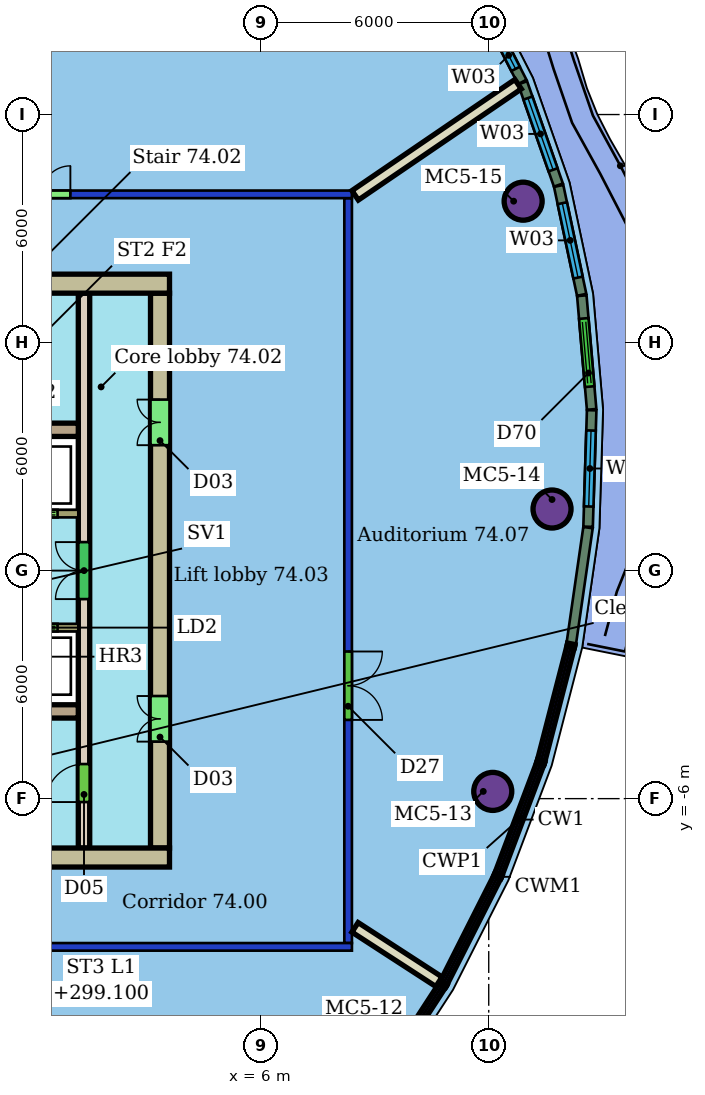
"""IFC4 building model, lengths in metres.
Left out: names, types, materials, properties, quantities, classifications, styles, units other than length and angle.
Written with IfcOpenShell. Run it as: python <this file> out.ifc"""

import sys

from ifc_helpers import new_model, si_unit, direction, frame, frame_2d, origin, origin_2d, place, context, subcontext, project, spatial, rectangle, hollow_circle, extrude, element, fill, save


model = new_model("IFC4")
c1 = context("Model", 3, precision=1e-05, world=origin(), true_north=direction((0.0, 1.0)))
c2 = subcontext(c1, "Body", "Model", "MODEL_VIEW")
j1 = project(units=[si_unit("LENGTHUNIT", "METRE"), si_unit("PLANEANGLEUNIT", "RADIAN")], contexts=[c1])
p1 = place(None, origin())
s1 = spatial("IfcSite", under=j1, at=p1, CompositionType="ELEMENT")
p2 = place(p1, origin())
s2 = spatial("IfcBuilding", under=s1, at=p2, CompositionType="ELEMENT")
p3 = place(p2, frame((0.0, 0.0, 297.3)))
s3 = spatial("IfcBuildingStorey", under=s2, at=p3, CompositionType="ELEMENT", Elevation=297.3)
for number, where, z_axis, x_axis in (
    (1, (12.106, -5.81, 0.0), (0.0, 0.0, 1.0), (1.0, 0.0, 0.0)),
    (2, (13.666, 1.62, 0.0), (0.0, 0.0, 1.0), (1.0, 0.0, 0.0)),
    (3, (12.906, 9.72, 0.0), (0.0, 0.0, 1.0), (1.0, 0.0, 0.0)),
):
    element("IfcColumn", number, at=place(p3, frame(where, z_axis=z_axis, x_axis=x_axis)), inside=s3, PredefinedType="COLUMN", context=c2, shape_type="SweptSolid", body=[
        extrude(hollow_circle(Radius=0.5, WallThickness=0.04, at=origin_2d()), origin(), (0.0, 0.0, 1.0), 3.45),
    ])
p4 = place(p3, frame((8.4, -9.9, 0.0), z_axis=(0.0, 0.0, 1.0), x_axis=(-1.0, 0.0, 0.0)))
e4 = element("IfcWall", 4, at=p4, inside=s3, PredefinedType="PARTITIONING", context=c2, shape_type="SweptSolid", body=[
    extrude(rectangle(XDim=28.8, YDim=0.2, at=frame_2d((14.4, 0.0))), origin(), (0.0, 0.0, 1.0), 3.1),
])
p5 = place(p4, frame((22.465, 0.0, 0.0)))
e5 = element("IfcOpeningElement", 5, at=p5, cuts=e4, PredefinedType="OPENING", context=c2, shape_type="SweptSolid", body=[
    extrude(rectangle(XDim=1.5, YDim=2.1, at=frame_2d((0.75, 1.05))), frame((0.0, 0.11, 0.0), z_axis=(0.0, -1.0, 0.0), x_axis=(1.0, 0.0, 0.0)), (0.0, 0.0, 1.0), 0.22),
])
p6 = place(p4, frame((17.885, 0.0, 0.0)))
e6 = element("IfcOpeningElement", 6, at=p6, cuts=e4, PredefinedType="OPENING", context=c2, shape_type="SweptSolid", body=[
    extrude(rectangle(XDim=0.9, YDim=2.1, at=frame_2d((0.45, 1.05))), frame((0.0, 0.11, 0.0), z_axis=(0.0, -1.0, 0.0), x_axis=(1.0, 0.0, 0.0)), (0.0, 0.0, 1.0), 0.22),
])
p7 = place(p4, frame((9.462, 0.0, 0.0)))
e7 = element("IfcOpeningElement", 7, at=p7, cuts=e4, PredefinedType="OPENING", context=c2, shape_type="SweptSolid", body=[
    extrude(rectangle(XDim=1.5, YDim=2.1, at=frame_2d((0.75, 1.05))), frame((0.0, 0.11, 0.0), z_axis=(0.0, -1.0, 0.0), x_axis=(1.0, 0.0, 0.0)), (0.0, 0.0, 1.0), 0.22),
])
p8 = place(p3, frame((-20.4, 9.9, 0.0), z_axis=(0.0, 0.0, 1.0), x_axis=(1.0, 0.0, 0.0)))
e8 = element("IfcWall", 8, at=p8, inside=s3, PredefinedType="PARTITIONING", context=c2, shape_type="SweptSolid", body=[
    extrude(rectangle(XDim=28.8, YDim=0.2, at=frame_2d((14.4, 0.0))), origin(), (0.0, 0.0, 1.0), 3.1),
])
p9 = place(p8, frame((11.686, 0.0, 0.0)))
e9 = element("IfcOpeningElement", 9, at=p9, cuts=e8, PredefinedType="OPENING", context=c2, shape_type="SweptSolid", body=[
    extrude(rectangle(XDim=1.8, YDim=2.1, at=frame_2d((0.9, 1.05))), frame((0.0, 0.11, 0.0), z_axis=(0.0, -1.0, 0.0), x_axis=(1.0, 0.0, 0.0)), (0.0, 0.0, 1.0), 0.22),
])
p10 = place(p8, frame((5.897, 0.0, 0.0)))
e10 = element("IfcOpeningElement", 10, at=p10, cuts=e8, PredefinedType="OPENING", context=c2, shape_type="SweptSolid", body=[
    extrude(rectangle(XDim=1.5, YDim=2.1, at=frame_2d((0.75, 1.05))), frame((0.0, 0.11, 0.0), z_axis=(0.0, -1.0, 0.0), x_axis=(1.0, 0.0, 0.0)), (0.0, 0.0, 1.0), 0.22),
])
p11 = place(p8, frame((19.891, 0.0, 0.0)))
e11 = element("IfcOpeningElement", 11, at=p11, cuts=e8, PredefinedType="OPENING", context=c2, shape_type="SweptSolid", body=[
    extrude(rectangle(XDim=1.5, YDim=2.4, at=frame_2d((0.75, 1.2))), frame((0.0, 0.11, 0.0), z_axis=(0.0, -1.0, 0.0), x_axis=(1.0, 0.0, 0.0)), (0.0, 0.0, 1.0), 0.22),
])
p12 = place(p3, frame((8.3, 9.8, 0.0), z_axis=(0.0, 0.0, 1.0), x_axis=(0.0, -1.0, 0.0)))
e12 = element("IfcWall", 12, at=p12, inside=s3, PredefinedType="PARTITIONING", context=c2, shape_type="SweptSolid", body=[
    extrude(rectangle(XDim=19.6, YDim=0.2, at=frame_2d((9.8, 0.0))), origin(), (0.0, 0.0, 1.0), 3.1),
])
p13 = place(p12, frame((11.929, 0.0, 0.0)))
e13 = element("IfcOpeningElement", 13, at=p13, cuts=e12, PredefinedType="OPENING", context=c2, shape_type="SweptSolid", body=[
    extrude(rectangle(XDim=1.8, YDim=2.4, at=frame_2d((0.9, 1.2))), frame((0.0, 0.11, 0.0), z_axis=(0.0, -1.0, 0.0), x_axis=(1.0, 0.0, 0.0)), (0.0, 0.0, 1.0), 0.22),
])
p14 = place(p3, frame((10.691, -10.819, 0.0), z_axis=(0.0, 0.0, 1.0), x_axis=(-0.839156905536, 0.543889407776, 0.0)))
e14 = element("IfcWall", 14, at=p14, inside=s3, PredefinedType="PARTITIONING", context=c2, shape_type="SweptSolid", body=[
    extrude(rectangle(XDim=2.633, YDim=0.3, at=frame_2d((1.316, 0.0))), origin(), (0.0, 0.0, 1.0), 3.45),
])
p15 = place(p3, frame((12.772, 12.797, 0.0), z_axis=(0.0, 0.0, 1.0), x_axis=(-0.826281084678, -0.563257995152, 0.0)))
e15 = element("IfcWall", 15, at=p15, inside=s3, PredefinedType="PARTITIONING", context=c2, shape_type="SweptSolid", body=[
    extrude(rectangle(XDim=5.19, YDim=0.3, at=frame_2d((2.595, 0.0))), origin(), (0.0, 0.0, 1.0), 3.45),
])
p16 = place(p3, frame((14.173, -1.912, 0.0), z_axis=(0.0, 0.0, 1.0), x_axis=(0.142921873415, 0.989733973399, 0.0)))
e16 = element("IfcWall", 16, at=p16, inside=s3, PredefinedType="SOLIDWALL", context=c2, shape_type="SweptSolid", body=[
    extrude(rectangle(XDim=3.075, YDim=0.25, at=frame_2d((1.537, 0.0))), origin(), (0.0, 0.0, 1.0), 3.15),
])
p17 = place(p3, frame((14.615, 1.154, 0.0), z_axis=(0.0, 0.0, 1.0), x_axis=(0.030643350627, 0.999530382261, 0.0)))
e17 = element("IfcWall", 17, at=p17, inside=s3, PredefinedType="SOLIDWALL", context=c2, shape_type="SweptSolid", body=[
    extrude(rectangle(XDim=3.067, YDim=0.25, at=frame_2d((1.534, 0.0))), origin(), (0.0, 0.0, 1.0), 3.15),
])
p18 = place(p17, frame((0.534, 0.0, 0.9)))
e18 = element("IfcOpeningElement", 18, at=p18, cuts=e17, PredefinedType="OPENING", context=c2, shape_type="SweptSolid", body=[
    extrude(rectangle(XDim=2.0, YDim=2.1, at=frame_2d((1.0, 1.05))), frame((0.0, 0.135, 0.0), z_axis=(0.0, -1.0, 0.0), x_axis=(1.0, 0.0, 0.0)), (0.0, 0.0, 1.0), 0.27),
])
p19 = place(p3, frame((14.708, 4.242, 0.0), z_axis=(0.0, 0.0, 1.0), x_axis=(-0.086187518859, 0.996278932625, 0.0)))
e19 = element("IfcWall", 19, at=p19, inside=s3, PredefinedType="SOLIDWALL", context=c2, shape_type="SweptSolid", body=[
    extrude(rectangle(XDim=3.003, YDim=0.25, at=frame_2d((1.501, 0.0))), origin(), (0.0, 0.0, 1.0), 3.15),
])
p20 = place(p19, frame((0.601, 0.0, 0.0)))
e20 = element("IfcOpeningElement", 20, at=p20, cuts=e19, PredefinedType="OPENING", context=c2, shape_type="SweptSolid", body=[
    extrude(rectangle(XDim=1.8, YDim=2.4, at=frame_2d((0.9, 1.2))), frame((0.0, 0.135, 0.0), z_axis=(0.0, -1.0, 0.0), x_axis=(1.0, 0.0, 0.0)), (0.0, 0.0, 1.0), 0.27),
])
p21 = place(p3, frame((14.446, 7.256, 0.0), z_axis=(0.0, 0.0, 1.0), x_axis=(-0.206909487165, 0.978360089191, 0.0)))
e21 = element("IfcWall", 21, at=p21, inside=s3, PredefinedType="SOLIDWALL", context=c2, shape_type="SweptSolid", body=[
    extrude(rectangle(XDim=2.929, YDim=0.25, at=frame_2d((1.464, 0.0))), origin(), (0.0, 0.0, 1.0), 3.15),
])
p22 = place(p21, frame((0.464, 0.0, 0.9)))
e22 = element("IfcOpeningElement", 22, at=p22, cuts=e21, PredefinedType="OPENING", context=c2, shape_type="SweptSolid", body=[
    extrude(rectangle(XDim=2.0, YDim=2.1, at=frame_2d((1.0, 1.05))), frame((0.0, 0.135, 0.0), z_axis=(0.0, -1.0, 0.0), x_axis=(1.0, 0.0, 0.0)), (0.0, 0.0, 1.0), 0.27),
])
p23 = place(p3, frame((13.833, 10.145, 0.0), z_axis=(0.0, 0.0, 1.0), x_axis=(-0.330480153195, 0.943812941395, 0.0)))
e23 = element("IfcWall", 23, at=p23, inside=s3, PredefinedType="SOLIDWALL", context=c2, shape_type="SweptSolid", body=[
    extrude(rectangle(XDim=2.85, YDim=0.25, at=frame_2d((1.425, 0.0))), origin(), (0.0, 0.0, 1.0), 3.15),
])
p24 = place(p23, frame((0.425, 0.0, 0.9)))
e24 = element("IfcOpeningElement", 24, at=p24, cuts=e23, PredefinedType="OPENING", context=c2, shape_type="SweptSolid", body=[
    extrude(rectangle(XDim=2.0, YDim=2.1, at=frame_2d((1.0, 1.05))), frame((0.0, 0.135, 0.0), z_axis=(0.0, -1.0, 0.0), x_axis=(1.0, 0.0, 0.0)), (0.0, 0.0, 1.0), 0.27),
])
p25 = place(p3, frame((12.882, 12.858, 0.0), z_axis=(0.0, 0.0, 1.0), x_axis=(-0.454701355294, 0.890643967865, 0.0)))
e25 = element("IfcWall", 25, at=p25, inside=s3, PredefinedType="SOLIDWALL", context=c2, shape_type="SweptSolid", body=[
    extrude(rectangle(XDim=2.772, YDim=0.25, at=frame_2d((1.386, 0.0))), origin(), (0.0, 0.0, 1.0), 3.15),
])
p26 = place(p25, frame((0.386, 0.0, 0.9)))
e26 = element("IfcOpeningElement", 26, at=p26, cuts=e25, PredefinedType="OPENING", context=c2, shape_type="SweptSolid", body=[
    extrude(rectangle(XDim=2.0, YDim=2.1, at=frame_2d((1.0, 1.05))), frame((0.0, 0.135, 0.0), z_axis=(0.0, -1.0, 0.0), x_axis=(1.0, 0.0, 0.0)), (0.0, 0.0, 1.0), 0.27),
])
p27 = place(p3, frame((3.6, 7.55, 0.0), z_axis=(0.0, 0.0, 1.0), x_axis=(-1.0, 0.0, 0.0)))
e27 = element("IfcWall", 27, at=p27, inside=s3, PredefinedType="SHEAR", context=c2, shape_type="SweptSolid", body=[
    extrude(rectangle(XDim=9.6, YDim=0.5, at=frame_2d((4.8, 0.0))), origin(), (0.0, 0.0, 1.0), 3.3),
])
p28 = place(p27, frame((3.2, 0.0, 0.0)))
e28 = element("IfcOpeningElement", 28, at=p28, cuts=e27, PredefinedType="OPENING", context=c2, shape_type="SweptSolid", body=[
    extrude(rectangle(XDim=1.2, YDim=2.1, at=frame_2d((0.6, 1.05))), frame((0.0, 0.26, 0.0), z_axis=(0.0, -1.0, 0.0), x_axis=(1.0, 0.0, 0.0)), (0.0, 0.0, 1.0), 0.52),
])
p29 = place(p3, frame((-15.6, -7.55, 0.0), z_axis=(0.0, 0.0, 1.0), x_axis=(1.0, 0.0, 0.0)))
e29 = element("IfcWall", 29, at=p29, inside=s3, PredefinedType="SHEAR", context=c2, shape_type="SweptSolid", body=[
    extrude(rectangle(XDim=19.2, YDim=0.5, at=frame_2d((9.6, 0.0))), origin(), (0.0, 0.0, 1.0), 3.3),
])
p30 = place(p29, frame((3.6, 0.0, 0.0)))
e30 = element("IfcOpeningElement", 30, at=p30, cuts=e29, PredefinedType="OPENING", context=c2, shape_type="SweptSolid", body=[
    extrude(rectangle(XDim=1.2, YDim=2.1, at=frame_2d((0.6, 1.05))), frame((0.0, 0.26, 0.0), z_axis=(0.0, -1.0, 0.0), x_axis=(1.0, 0.0, 0.0)), (0.0, 0.0, 1.0), 0.52),
])
p31 = place(p3, frame((3.35, -7.3, 0.0), z_axis=(0.0, 0.0, 1.0), x_axis=(0.0, 1.0, 0.0)))
e31 = element("IfcWall", 31, at=p31, inside=s3, PredefinedType="SHEAR", context=c2, shape_type="SweptSolid", body=[
    extrude(rectangle(XDim=14.6, YDim=0.5, at=frame_2d((7.3, 0.0))), origin(), (0.0, 0.0, 1.0), 3.3),
])
p32 = place(p31, frame((2.8, 0.0, 0.0)))
e32 = element("IfcOpeningElement", 32, at=p32, cuts=e31, PredefinedType="OPENING", context=c2, shape_type="SweptSolid", body=[
    extrude(rectangle(XDim=1.2, YDim=2.1, at=frame_2d((0.6, 1.05))), frame((0.0, 0.26, 0.0), z_axis=(0.0, -1.0, 0.0), x_axis=(1.0, 0.0, 0.0)), (0.0, 0.0, 1.0), 0.52),
])
p33 = place(p31, frame((10.6, 0.0, 0.0)))
e33 = element("IfcOpeningElement", 33, at=p33, cuts=e31, PredefinedType="OPENING", context=c2, shape_type="SweptSolid", body=[
    extrude(rectangle(XDim=1.2, YDim=2.1, at=frame_2d((0.6, 1.05))), frame((0.0, 0.26, 0.0), z_axis=(0.0, -1.0, 0.0), x_axis=(1.0, 0.0, 0.0)), (0.0, 0.0, 1.0), 0.52),
])
for number, where, z_axis, x_axis in (
    (34, (-6.0, 3.705, 0.0), (0.0, 0.0, 1.0), (1.0, 0.0, 0.0)),
    (35, (-6.0, -3.705, 0.0), (0.0, 0.0, 1.0), (1.0, 0.0, 0.0)),
):
    element("IfcWall", number, at=place(p3, frame(where, z_axis=z_axis, x_axis=x_axis)), inside=s3, PredefinedType="SHEAR", context=c2, shape_type="SweptSolid", body=[
        extrude(rectangle(XDim=7.2, YDim=0.35, at=frame_2d((3.6, 0.0))), origin(), (0.0, 0.0, 1.0), 3.3),
    ])
p34 = place(p3, frame((1.35, -7.3, 0.0), z_axis=(0.0, 0.0, 1.0), x_axis=(0.0, 1.0, 0.0)))
e36 = element("IfcWall", 36, at=p34, inside=s3, PredefinedType="SHEAR", context=c2, shape_type="SweptSolid", body=[
    extrude(rectangle(XDim=14.6, YDim=0.3, at=frame_2d((7.3, 0.0))), origin(), (0.0, 0.0, 1.0), 3.3),
])
p35 = place(p34, frame((1.21, 0.0, 0.0)))
e37 = element("IfcOpeningElement", 37, at=p35, cuts=e36, PredefinedType="OPENING", context=c2, shape_type="SweptSolid", body=[
    extrude(rectangle(XDim=1.0, YDim=2.1, at=frame_2d((0.5, 1.05))), frame((0.0, 0.16, 0.0), z_axis=(0.0, -1.0, 0.0), x_axis=(1.0, 0.0, 0.0)), (0.0, 0.0, 1.0), 0.32),
])
p36 = place(p34, frame((6.55, 0.0, 0.0)))
e38 = element("IfcOpeningElement", 38, at=p36, cuts=e36, PredefinedType="OPENING", context=c2, shape_type="SweptSolid", body=[
    extrude(rectangle(XDim=1.5, YDim=2.1, at=frame_2d((0.75, 1.05))), frame((0.0, 0.16, 0.0), z_axis=(0.0, -1.0, 0.0), x_axis=(1.0, 0.0, 0.0)), (0.0, 0.0, 1.0), 0.32),
])
p37 = place(p3, frame((-13.2, 1.5, 0.0), z_axis=(0.0, 0.0, 1.0), x_axis=(1.0, 0.0, 0.0)))
e39 = element("IfcWall", 39, at=p37, inside=s3, PredefinedType="SHEAR", context=c2, shape_type="SweptSolid", body=[
    extrude(rectangle(XDim=14.4, YDim=0.2, at=frame_2d((7.2, 0.0))), origin(), (0.0, 0.0, 1.0), 3.3),
])
p38 = place(p37, frame((10.312, 0.0, 0.0)))
e40 = element("IfcOpeningElement", 40, at=p38, cuts=e39, PredefinedType="OPENING", context=c2, shape_type="SweptSolid", body=[
    extrude(rectangle(XDim=1.1, YDim=2.1, at=frame_2d((0.55, 1.05))), frame((0.0, 0.11, 0.0), z_axis=(0.0, -1.0, 0.0), x_axis=(1.0, 0.0, 0.0)), (0.0, 0.0, 1.0), 0.22),
])
p39 = place(p37, frame((12.754, 0.0, 0.0)))
e41 = element("IfcOpeningElement", 41, at=p39, cuts=e39, PredefinedType="OPENING", context=c2, shape_type="SweptSolid", body=[
    extrude(rectangle(XDim=1.1, YDim=2.1, at=frame_2d((0.55, 1.05))), frame((0.0, 0.11, 0.0), z_axis=(0.0, -1.0, 0.0), x_axis=(1.0, 0.0, 0.0)), (0.0, 0.0, 1.0), 0.22),
])
p40 = place(p37, frame((0.15, 0.0, 0.0)))
e42 = element("IfcOpeningElement", 42, at=p40, cuts=e39, PredefinedType="OPENING", context=c2, shape_type="SweptSolid", body=[
    extrude(rectangle(XDim=0.9, YDim=2.1, at=frame_2d((0.45, 1.05))), frame((0.0, 0.11, 0.0), z_axis=(0.0, -1.0, 0.0), x_axis=(1.0, 0.0, 0.0)), (0.0, 0.0, 1.0), 0.22),
])
p41 = place(p37, frame((4.983, 0.0, 0.0)))
e43 = element("IfcOpeningElement", 43, at=p41, cuts=e39, PredefinedType="OPENING", context=c2, shape_type="SweptSolid", body=[
    extrude(rectangle(XDim=0.9, YDim=2.1, at=frame_2d((0.45, 1.05))), frame((0.0, 0.11, 0.0), z_axis=(0.0, -1.0, 0.0), x_axis=(1.0, 0.0, 0.0)), (0.0, 0.0, 1.0), 0.22),
])
p42 = place(p3, frame((1.2, -1.5, 0.0), z_axis=(0.0, 0.0, 1.0), x_axis=(-1.0, 0.0, 0.0)))
e44 = element("IfcWall", 44, at=p42, inside=s3, PredefinedType="SHEAR", context=c2, shape_type="SweptSolid", body=[
    extrude(rectangle(XDim=14.4, YDim=0.2, at=frame_2d((7.2, 0.0))), origin(), (0.0, 0.0, 1.0), 3.3),
])
p43 = place(p42, frame((7.821, 0.0, 0.0)))
e45 = element("IfcOpeningElement", 45, at=p43, cuts=e44, PredefinedType="OPENING", context=c2, shape_type="SweptSolid", body=[
    extrude(rectangle(XDim=1.2, YDim=2.1, at=frame_2d((0.6, 1.05))), frame((0.0, 0.11, 0.0), z_axis=(0.0, -1.0, 0.0), x_axis=(1.0, 0.0, 0.0)), (0.0, 0.0, 1.0), 0.22),
])
p44 = place(p42, frame((0.546, 0.0, 0.0)))
e46 = element("IfcOpeningElement", 46, at=p44, cuts=e44, PredefinedType="OPENING", context=c2, shape_type="SweptSolid", body=[
    extrude(rectangle(XDim=1.1, YDim=2.1, at=frame_2d((0.55, 1.05))), frame((0.0, 0.11, 0.0), z_axis=(0.0, -1.0, 0.0), x_axis=(1.0, 0.0, 0.0)), (0.0, 0.0, 1.0), 0.22),
])
p45 = place(p42, frame((4.983, 0.0, 0.0)))
e47 = element("IfcOpeningElement", 47, at=p45, cuts=e44, PredefinedType="OPENING", context=c2, shape_type="SweptSolid", body=[
    extrude(rectangle(XDim=1.0, YDim=2.1, at=frame_2d((0.5, 1.05))), frame((0.0, 0.11, 0.0), z_axis=(0.0, -1.0, 0.0), x_axis=(1.0, 0.0, 0.0)), (0.0, 0.0, 1.0), 0.22),
])
p46 = place(p42, frame((2.592, 0.0, 0.0)))
e48 = element("IfcOpeningElement", 48, at=p46, cuts=e44, PredefinedType="OPENING", context=c2, shape_type="SweptSolid", body=[
    extrude(rectangle(XDim=1.0, YDim=2.1, at=frame_2d((0.5, 1.05))), frame((0.0, 0.11, 0.0), z_axis=(0.0, -1.0, 0.0), x_axis=(1.0, 0.0, 0.0)), (0.0, 0.0, 1.0), 0.22),
])
p47 = place(p13, origin())
e49 = element("IfcDoor", 49, at=p47, inside=s3, OperationType="DOUBLE_DOOR_SINGLE_SWING", PredefinedType="DOOR", context=c2, shape_type="SweptSolid", body=[
    extrude(rectangle(XDim=1.8, YDim=2.4, at=frame_2d((0.9, 1.2))), frame((0.0, 0.025, 0.0), z_axis=(0.0, -1.0, 0.0), x_axis=(1.0, 0.0, 0.0)), (0.0, 0.0, 1.0), 0.05),
])
fill(e13, e49)
p48 = place(p11, origin())
e50 = element("IfcDoor", 50, at=p48, inside=s3, OperationType="DOUBLE_DOOR_SINGLE_SWING", PredefinedType="DOOR", context=c2, shape_type="SweptSolid", body=[
    extrude(rectangle(XDim=1.5, YDim=2.4, at=frame_2d((0.75, 1.2))), frame((0.0, 0.025, 0.0), z_axis=(0.0, -1.0, 0.0), x_axis=(1.0, 0.0, 0.0)), (0.0, 0.0, 1.0), 0.05),
])
fill(e11, e50)
p49 = place(p18, origin())
e51 = element("IfcWindow", 51, at=p49, inside=s3, PartitioningType="SINGLE_PANEL", PredefinedType="WINDOW", context=c2, shape_type="SweptSolid", body=[
    extrude(rectangle(XDim=2.0, YDim=2.1, at=frame_2d((1.0, 1.05))), frame((0.0, 0.03, 0.0), z_axis=(0.0, -1.0, 0.0), x_axis=(1.0, 0.0, 0.0)), (0.0, 0.0, 1.0), 0.06),
])
fill(e18, e51)
p50 = place(p20, origin())
e52 = element("IfcDoor", 52, at=p50, inside=s3, OperationType="DOUBLE_DOOR_SLIDING", PredefinedType="DOOR", context=c2, shape_type="SweptSolid", body=[
    extrude(rectangle(XDim=1.8, YDim=2.4, at=frame_2d((0.9, 1.2))), frame((0.0, 0.025, 0.0), z_axis=(0.0, -1.0, 0.0), x_axis=(1.0, 0.0, 0.0)), (0.0, 0.0, 1.0), 0.05),
])
fill(e20, e52)
p51 = place(p22, origin())
e53 = element("IfcWindow", 53, at=p51, inside=s3, PartitioningType="SINGLE_PANEL", PredefinedType="WINDOW", context=c2, shape_type="SweptSolid", body=[
    extrude(rectangle(XDim=2.0, YDim=2.1, at=frame_2d((1.0, 1.05))), frame((0.0, 0.03, 0.0), z_axis=(0.0, -1.0, 0.0), x_axis=(1.0, 0.0, 0.0)), (0.0, 0.0, 1.0), 0.06),
])
fill(e22, e53)
p52 = place(p24, origin())
e54 = element("IfcWindow", 54, at=p52, inside=s3, PartitioningType="SINGLE_PANEL", PredefinedType="WINDOW", context=c2, shape_type="SweptSolid", body=[
    extrude(rectangle(XDim=2.0, YDim=2.1, at=frame_2d((1.0, 1.05))), frame((0.0, 0.03, 0.0), z_axis=(0.0, -1.0, 0.0), x_axis=(1.0, 0.0, 0.0)), (0.0, 0.0, 1.0), 0.06),
])
fill(e24, e54)
p53 = place(p26, origin())
e55 = element("IfcWindow", 55, at=p53, inside=s3, PartitioningType="SINGLE_PANEL", PredefinedType="WINDOW", context=c2, shape_type="SweptSolid", body=[
    extrude(rectangle(XDim=2.0, YDim=2.1, at=frame_2d((1.0, 1.05))), frame((0.0, 0.03, 0.0), z_axis=(0.0, -1.0, 0.0), x_axis=(1.0, 0.0, 0.0)), (0.0, 0.0, 1.0), 0.06),
])
fill(e26, e55)
p54 = place(p32, origin())
e56 = element("IfcDoor", 56, at=p54, inside=s3, OperationType="DOUBLE_DOOR_SINGLE_SWING", PredefinedType="NOTDEFINED", context=c2, shape_type="SweptSolid", body=[
    extrude(rectangle(XDim=1.2, YDim=2.1, at=frame_2d((0.6, 1.05))), frame((0.0, 0.025, 0.0), z_axis=(0.0, -1.0, 0.0), x_axis=(1.0, 0.0, 0.0)), (0.0, 0.0, 1.0), 0.05),
])
fill(e32, e56)
p55 = place(p33, origin())
e57 = element("IfcDoor", 57, at=p55, inside=s3, OperationType="DOUBLE_DOOR_SINGLE_SWING", PredefinedType="NOTDEFINED", context=c2, shape_type="SweptSolid", body=[
    extrude(rectangle(XDim=1.2, YDim=2.1, at=frame_2d((0.6, 1.05))), frame((0.0, 0.025, 0.0), z_axis=(0.0, -1.0, 0.0), x_axis=(1.0, 0.0, 0.0)), (0.0, 0.0, 1.0), 0.05),
])
fill(e33, e57)
p56 = place(p35, origin())
e58 = element("IfcDoor", 58, at=p56, inside=s3, OperationType="SINGLE_SWING_LEFT", PredefinedType="NOTDEFINED", context=c2, shape_type="SweptSolid", body=[
    extrude(rectangle(XDim=1.0, YDim=2.1, at=frame_2d((0.5, 1.05))), frame((0.0, 0.025, 0.0), z_axis=(0.0, -1.0, 0.0), x_axis=(1.0, 0.0, 0.0)), (0.0, 0.0, 1.0), 0.05),
])
fill(e37, e58)
p57 = place(p36, origin())
e59 = element("IfcDoor", 59, at=p57, inside=s3, OperationType="DOUBLE_DOOR_SINGLE_SWING", PredefinedType="NOTDEFINED", context=c2, shape_type="SweptSolid", body=[
    extrude(rectangle(XDim=1.5, YDim=2.1, at=frame_2d((0.75, 1.05))), frame((0.0, 0.025, 0.0), z_axis=(0.0, -1.0, 0.0), x_axis=(1.0, 0.0, 0.0)), (0.0, 0.0, 1.0), 0.05),
])
fill(e38, e59)
p58 = place(p39, origin())
e60 = element("IfcDoor", 60, at=p58, inside=s3, OperationType="DOUBLE_DOOR_SLIDING", PredefinedType="NOTDEFINED", context=c2, shape_type="SweptSolid", body=[
    extrude(rectangle(XDim=1.1, YDim=2.1, at=frame_2d((0.55, 1.05))), frame((0.0, 0.025, 0.0), z_axis=(0.0, -1.0, 0.0), x_axis=(1.0, 0.0, 0.0)), (0.0, 0.0, 1.0), 0.05),
])
fill(e41, e60)
p59 = place(p44, origin())
e61 = element("IfcDoor", 61, at=p59, inside=s3, OperationType="DOUBLE_DOOR_SLIDING", PredefinedType="NOTDEFINED", context=c2, shape_type="SweptSolid", body=[
    extrude(rectangle(XDim=1.1, YDim=2.1, at=frame_2d((0.55, 1.05))), frame((0.0, 0.025, 0.0), z_axis=(0.0, -1.0, 0.0), x_axis=(1.0, 0.0, 0.0)), (0.0, 0.0, 1.0), 0.05),
])
fill(e46, e61)
save(model, sys.argv[1])
